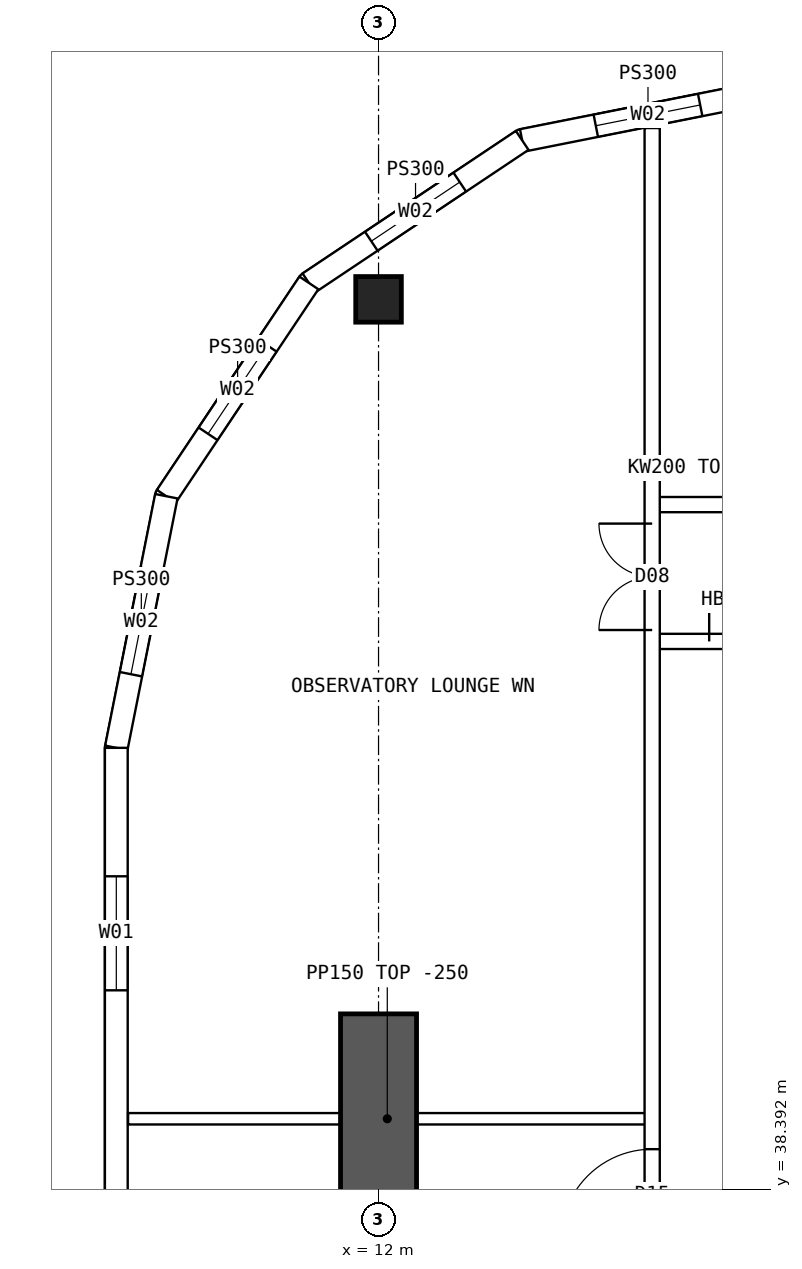
"""IFC4 building model, lengths in metres.
Left out: names, types, materials, properties, quantities, classifications, styles, units other than length and angle.
Written with IfcOpenShell. Run it as: python <this file> out.ifc"""

import sys

from ifc_helpers import new_model, si_unit, direction, frame, frame_2d, origin, origin_2d, place, context, subcontext, project, spatial, polyline, rectangle, hollow_rectangle, outline, extrude, element, fill, save


model = new_model("IFC4")
c1 = context("Model", 3, precision=1e-05, world=origin(), true_north=direction((0.0, 1.0)))
c2 = subcontext(c1, "Body", "Model", "MODEL_VIEW")
j1 = project(units=[si_unit("LENGTHUNIT", "METRE"), si_unit("PLANEANGLEUNIT", "RADIAN")], contexts=[c1])
p1 = place(None, origin())
s1 = spatial("IfcSite", under=j1, at=p1, CompositionType="ELEMENT")
p2 = place(p1, origin())
s2 = spatial("IfcBuilding", under=s1, at=p2, CompositionType="ELEMENT")
p3 = place(p2, frame((0.0, 0.0, 224.05)))
s3 = spatial("IfcBuildingStorey", under=s2, at=p3, CompositionType="ELEMENT", Elevation=224.05)
p4 = place(p3, frame((12.0, 50.1, 0.0), z_axis=(0.0, 0.0, 1.0), x_axis=(1.0, 0.0, 0.0)))
e1 = element("IfcColumn", 1, at=p4, inside=s3, PredefinedType="COLUMN", context=c2, shape_type="SweptSolid", body=[
    extrude(hollow_rectangle(XDim=0.6, YDim=0.6, WallThickness=0.06, at=origin_2d()), origin(), (0.0, 0.0, 1.0), 3.75),
])
p5 = place(p3, frame((12.0, 35.7, 0.0), z_axis=(0.0, 0.0, 1.0), x_axis=(0.0, 1.0, 0.0)))
e2 = element("IfcWall", 2, at=p5, inside=s3, PredefinedType="SHEAR", context=c2, shape_type="SweptSolid", body=[
    extrude(rectangle(XDim=5.0, YDim=1.0, at=frame_2d((2.5, 0.0))), origin(), (0.0, 0.0, 1.0), 3.75),
])
p6 = place(p3, frame((8.55, 44.2, 0.0), z_axis=(0.0, 0.0, 1.0), x_axis=(0.0, -1.0, 0.0)))
e3 = element("IfcWall", 3, at=p6, inside=s3, PredefinedType="SOLIDWALL", context=c2, shape_type="SweptSolid", body=[
    extrude(outline(polyline([(-0.015, -0.15), (24.415, -0.15), (24.385, 0.15), (0.015, 0.15), (-0.015, -0.15)])), origin(), (0.0, 0.0, 1.0), 3.5),
])
p7 = place(p6, frame((1.69, 0.0, 0.9)))
e4 = element("IfcOpeningElement", 4, at=p7, cuts=e3, PredefinedType="OPENING", context=c2, shape_type="SweptSolid", body=[
    extrude(rectangle(XDim=1.5, YDim=2.0, at=frame_2d((0.75, 1.0))), frame((0.0, 0.16, 0.0), z_axis=(0.0, -1.0, 0.0), x_axis=(1.0, 0.0, 0.0)), (0.0, 0.0, 1.0), 0.32),
])
p8 = place(p6, frame((6.57, 0.0, 0.9)))
e5 = element("IfcOpeningElement", 5, at=p8, cuts=e3, PredefinedType="OPENING", context=c2, shape_type="SweptSolid", body=[
    extrude(rectangle(XDim=1.5, YDim=2.0, at=frame_2d((0.75, 1.0))), frame((0.0, 0.16, 0.0), z_axis=(0.0, -1.0, 0.0), x_axis=(1.0, 0.0, 0.0)), (0.0, 0.0, 1.0), 0.32),
])
p9 = place(p6, frame((11.45, 0.0, 0.9)))
e6 = element("IfcOpeningElement", 6, at=p9, cuts=e3, PredefinedType="OPENING", context=c2, shape_type="SweptSolid", body=[
    extrude(rectangle(XDim=1.5, YDim=2.0, at=frame_2d((0.75, 1.0))), frame((0.0, 0.16, 0.0), z_axis=(0.0, -1.0, 0.0), x_axis=(1.0, 0.0, 0.0)), (0.0, 0.0, 1.0), 0.32),
])
p10 = place(p6, frame((16.33, 0.0, 0.9)))
e7 = element("IfcOpeningElement", 7, at=p10, cuts=e3, PredefinedType="OPENING", context=c2, shape_type="SweptSolid", body=[
    extrude(rectangle(XDim=1.5, YDim=2.0, at=frame_2d((0.75, 1.0))), frame((0.0, 0.16, 0.0), z_axis=(0.0, -1.0, 0.0), x_axis=(1.0, 0.0, 0.0)), (0.0, 0.0, 1.0), 0.32),
])
p11 = place(p6, frame((21.21, 0.0, 0.9)))
e8 = element("IfcOpeningElement", 8, at=p11, cuts=e3, PredefinedType="OPENING", context=c2, shape_type="SweptSolid", body=[
    extrude(rectangle(XDim=1.5, YDim=2.0, at=frame_2d((0.75, 1.0))), frame((0.0, 0.16, 0.0), z_axis=(0.0, -1.0, 0.0), x_axis=(1.0, 0.0, 0.0)), (0.0, 0.0, 1.0), 0.32),
])
p12 = place(p3, frame((17.2, 52.85, 0.0), z_axis=(0.0, 0.0, 1.0), x_axis=(-0.98078325777, -0.195100490205, 0.0)))
e9 = element("IfcWall", 9, at=p12, inside=s3, PredefinedType="SOLIDWALL", context=c2, shape_type="SweptSolid", body=[
    extrude(outline(polyline([(-0.03, -0.15), (3.405, -0.15), (3.345, 0.15), (0.03, 0.15), (-0.03, -0.15)])), origin(), (0.0, 0.0, 1.0), 3.5),
])
p13 = place(p12, frame((0.988, 0.0, 0.9)))
e10 = element("IfcOpeningElement", 10, at=p13, cuts=e9, PredefinedType="OPENING", context=c2, shape_type="SweptSolid", body=[
    extrude(rectangle(XDim=1.4, YDim=1.8, at=frame_2d((0.7, 0.9))), frame((0.0, 0.16, 0.0), z_axis=(0.0, -1.0, 0.0), x_axis=(1.0, 0.0, 0.0)), (0.0, 0.0, 1.0), 0.32),
])
p14 = place(p3, frame((13.89, 52.192, 0.0), z_axis=(0.0, 0.0, 1.0), x_axis=(-0.831460037396, -0.555584562613, 0.0)))
e11 = element("IfcWall", 11, at=p14, inside=s3, PredefinedType="SOLIDWALL", context=c2, shape_type="SweptSolid", body=[
    extrude(outline(polyline([(-0.03, -0.15), (3.405, -0.15), (3.345, 0.15), (0.03, 0.15), (-0.03, -0.15)])), origin(), (0.0, 0.0, 1.0), 3.5),
])
p15 = place(p14, frame((0.988, 0.0, 0.9)))
e12 = element("IfcOpeningElement", 12, at=p15, cuts=e11, PredefinedType="OPENING", context=c2, shape_type="SweptSolid", body=[
    extrude(rectangle(XDim=1.4, YDim=1.8, at=frame_2d((0.7, 0.9))), frame((0.0, 0.16, 0.0), z_axis=(0.0, -1.0, 0.0), x_axis=(1.0, 0.0, 0.0)), (0.0, 0.0, 1.0), 0.32),
])
p16 = place(p3, frame((11.083, 50.316, 0.0), z_axis=(0.0, 0.0, 1.0), x_axis=(-0.555567969291, -0.831471124873, 0.0)))
e13 = element("IfcWall", 13, at=p16, inside=s3, PredefinedType="SOLIDWALL", context=c2, shape_type="SweptSolid", body=[
    extrude(outline(polyline([(-0.03, -0.15), (3.405, -0.15), (3.345, 0.15), (0.03, 0.15), (-0.03, -0.15)])), origin(), (0.0, 0.0, 1.0), 3.5),
])
p17 = place(p16, frame((0.988, 0.0, 0.9)))
e14 = element("IfcOpeningElement", 14, at=p17, cuts=e13, PredefinedType="OPENING", context=c2, shape_type="SweptSolid", body=[
    extrude(rectangle(XDim=1.4, YDim=1.8, at=frame_2d((0.7, 0.9))), frame((0.0, 0.16, 0.0), z_axis=(0.0, -1.0, 0.0), x_axis=(1.0, 0.0, 0.0)), (0.0, 0.0, 1.0), 0.32),
])
p18 = place(p3, frame((9.208, 47.51, 0.0), z_axis=(0.0, 0.0, 1.0), x_axis=(-0.19508664885, -0.980786011034, 0.0)))
e15 = element("IfcWall", 15, at=p18, inside=s3, PredefinedType="SOLIDWALL", context=c2, shape_type="SweptSolid", body=[
    extrude(outline(polyline([(-0.03, -0.15), (3.39, -0.15), (3.36, 0.15), (0.03, 0.15), (-0.03, -0.15)])), origin(), (0.0, 0.0, 1.0), 3.5),
])
p19 = place(p18, frame((0.988, 0.0, 0.9)))
e16 = element("IfcOpeningElement", 16, at=p19, cuts=e15, PredefinedType="OPENING", context=c2, shape_type="SweptSolid", body=[
    extrude(rectangle(XDim=1.4, YDim=1.8, at=frame_2d((0.7, 0.9))), frame((0.0, 0.16, 0.0), z_axis=(0.0, -1.0, 0.0), x_axis=(1.0, 0.0, 0.0)), (0.0, 0.0, 1.0), 0.32),
])
p20 = place(p3, frame((15.6, 47.4, 0.0), z_axis=(0.0, 0.0, 1.0), x_axis=(1.0, 0.0, 0.0)))
e17 = element("IfcWall", 17, at=p20, inside=s3, PredefinedType="SOLIDWALL", context=c2, shape_type="SweptSolid", body=[
    extrude(rectangle(XDim=2.05, YDim=0.2, at=frame_2d((1.025, 0.0))), origin(), (0.0, 0.0, 1.0), 3.5),
])
p21 = place(p20, frame((0.95, 0.0, 0.0)))
e18 = element("IfcOpeningElement", 18, at=p21, cuts=e17, PredefinedType="OPENING", context=c2, shape_type="SweptSolid", body=[
    extrude(rectangle(XDim=0.9, YDim=2.1, at=frame_2d((0.45, 1.05))), frame((0.0, 0.11, 0.0), z_axis=(0.0, -1.0, 0.0), x_axis=(1.0, 0.0, 0.0)), (0.0, 0.0, 1.0), 0.22),
])
p22 = place(p3, frame((15.6, 45.6, 0.0), z_axis=(0.0, 0.0, 1.0), x_axis=(1.0, 0.0, 0.0)))
e19 = element("IfcWall", 19, at=p22, inside=s3, PredefinedType="SOLIDWALL", context=c2, shape_type="SweptSolid", body=[
    extrude(rectangle(XDim=2.05, YDim=0.2, at=frame_2d((1.025, 0.0))), origin(), (0.0, 0.0, 1.0), 3.5),
])
p23 = place(p22, frame((0.75, 0.0, 0.0)))
e20 = element("IfcOpeningElement", 20, at=p23, cuts=e19, PredefinedType="OPENING", context=c2, shape_type="SweptSolid", body=[
    extrude(rectangle(XDim=1.2, YDim=2.1, at=frame_2d((0.6, 1.05))), frame((0.0, 0.11, 0.0), z_axis=(0.0, -1.0, 0.0), x_axis=(1.0, 0.0, 0.0)), (0.0, 0.0, 1.0), 0.22),
])
p24 = place(p3, frame((15.6, 11.646, 0.0), z_axis=(0.0, 0.0, 1.0), x_axis=(0.0, 1.0, 0.0)))
e21 = element("IfcWall", 21, at=p24, inside=s3, PredefinedType="SOLIDWALL", context=c2, shape_type="SweptSolid", body=[
    extrude(rectangle(XDim=40.708, YDim=0.2, at=frame_2d((20.354, 0.0))), origin(), (0.0, 0.0, 1.0), 3.5),
])
p25 = place(p24, frame((13.434, 0.0, 0.0)))
e22 = element("IfcOpeningElement", 22, at=p25, cuts=e21, PredefinedType="OPENING", context=c2, shape_type="SweptSolid", body=[
    extrude(rectangle(XDim=1.2, YDim=2.1, at=frame_2d((0.6, 1.05))), frame((0.0, 0.11, 0.0), z_axis=(0.0, -1.0, 0.0), x_axis=(1.0, 0.0, 0.0)), (0.0, 0.0, 1.0), 0.22),
])
p26 = place(p24, frame((26.074, 0.0, 0.0)))
e23 = element("IfcOpeningElement", 23, at=p26, cuts=e21, PredefinedType="OPENING", context=c2, shape_type="SweptSolid", body=[
    extrude(rectangle(XDim=1.2, YDim=2.1, at=frame_2d((0.6, 1.05))), frame((0.0, 0.11, 0.0), z_axis=(0.0, -1.0, 0.0), x_axis=(1.0, 0.0, 0.0)), (0.0, 0.0, 1.0), 0.22),
])
p27 = place(p24, frame((5.104, 0.0, 0.0)))
e24 = element("IfcOpeningElement", 24, at=p27, cuts=e21, PredefinedType="OPENING", context=c2, shape_type="SweptSolid", body=[
    extrude(rectangle(XDim=1.4, YDim=2.1, at=frame_2d((0.7, 1.05))), frame((0.0, 0.11, 0.0), z_axis=(0.0, -1.0, 0.0), x_axis=(1.0, 0.0, 0.0)), (0.0, 0.0, 1.0), 0.22),
])
p28 = place(p24, frame((34.104, 0.0, 0.0)))
e25 = element("IfcOpeningElement", 25, at=p28, cuts=e21, PredefinedType="OPENING", context=c2, shape_type="SweptSolid", body=[
    extrude(rectangle(XDim=1.4, YDim=2.1, at=frame_2d((0.7, 1.05))), frame((0.0, 0.11, 0.0), z_axis=(0.0, -1.0, 0.0), x_axis=(1.0, 0.0, 0.0)), (0.0, 0.0, 1.0), 0.22),
])
p29 = place(p3, frame((8.705, 39.32, 0.0), z_axis=(0.0, 0.0, 1.0), x_axis=(1.0, 0.0, 0.0)))
e26 = element("IfcWall", 26, at=p29, inside=s3, PredefinedType="PARTITIONING", context=c2, shape_type="SweptSolid", body=[
    extrude(rectangle(XDim=6.82, YDim=0.15, at=frame_2d((3.41, 0.0))), origin(), (0.0, 0.0, 1.0), 3.5),
])
p30 = place(p7, origin())
e27 = element("IfcWindow", 27, at=p30, inside=s3, PartitioningType="SINGLE_PANEL", PredefinedType="WINDOW", context=c2, shape_type="SweptSolid", body=[
    extrude(rectangle(XDim=1.5, YDim=2.0, at=frame_2d((0.75, 1.0))), frame((0.0, 0.03, 0.0), z_axis=(0.0, -1.0, 0.0), x_axis=(1.0, 0.0, 0.0)), (0.0, 0.0, 1.0), 0.06),
])
fill(e4, e27)
p31 = place(p13, origin())
e28 = element("IfcWindow", 28, at=p31, inside=s3, PartitioningType="SINGLE_PANEL", PredefinedType="WINDOW", context=c2, shape_type="SweptSolid", body=[
    extrude(rectangle(XDim=1.4, YDim=1.8, at=frame_2d((0.7, 0.9))), frame((0.0, 0.03, 0.0), z_axis=(0.0, -1.0, 0.0), x_axis=(1.0, 0.0, 0.0)), (0.0, 0.0, 1.0), 0.06),
])
fill(e10, e28)
p32 = place(p15, origin())
e29 = element("IfcWindow", 29, at=p32, inside=s3, PartitioningType="SINGLE_PANEL", PredefinedType="WINDOW", context=c2, shape_type="SweptSolid", body=[
    extrude(rectangle(XDim=1.4, YDim=1.8, at=frame_2d((0.7, 0.9))), frame((0.0, 0.03, 0.0), z_axis=(0.0, -1.0, 0.0), x_axis=(1.0, 0.0, 0.0)), (0.0, 0.0, 1.0), 0.06),
])
fill(e12, e29)
p33 = place(p17, origin())
e30 = element("IfcWindow", 30, at=p33, inside=s3, PartitioningType="SINGLE_PANEL", PredefinedType="WINDOW", context=c2, shape_type="SweptSolid", body=[
    extrude(rectangle(XDim=1.4, YDim=1.8, at=frame_2d((0.7, 0.9))), frame((0.0, 0.03, 0.0), z_axis=(0.0, -1.0, 0.0), x_axis=(1.0, 0.0, 0.0)), (0.0, 0.0, 1.0), 0.06),
])
fill(e14, e30)
p34 = place(p19, origin())
e31 = element("IfcWindow", 31, at=p34, inside=s3, PartitioningType="SINGLE_PANEL", PredefinedType="WINDOW", context=c2, shape_type="SweptSolid", body=[
    extrude(rectangle(XDim=1.4, YDim=1.8, at=frame_2d((0.7, 0.9))), frame((0.0, 0.03, 0.0), z_axis=(0.0, -1.0, 0.0), x_axis=(1.0, 0.0, 0.0)), (0.0, 0.0, 1.0), 0.06),
])
fill(e16, e31)
p35 = place(p23, origin())
e32 = element("IfcDoor", 32, at=p35, inside=s3, OperationType="DOUBLE_DOOR_SINGLE_SWING", PredefinedType="DOOR", context=c2, shape_type="SweptSolid", body=[
    extrude(rectangle(XDim=1.2, YDim=2.1, at=frame_2d((0.6, 1.05))), frame((0.0, 0.025, 0.0), z_axis=(0.0, -1.0, 0.0), x_axis=(1.0, 0.0, 0.0)), (0.0, 0.0, 1.0), 0.05),
])
fill(e20, e32)
p36 = place(p26, origin())
e33 = element("IfcDoor", 33, at=p36, inside=s3, OperationType="SINGLE_SWING_LEFT", PredefinedType="DOOR", context=c2, shape_type="SweptSolid", body=[
    extrude(rectangle(XDim=1.2, YDim=2.1, at=frame_2d((0.6, 1.05))), frame((0.0, 0.025, 0.0), z_axis=(0.0, -1.0, 0.0), x_axis=(1.0, 0.0, 0.0)), (0.0, 0.0, 1.0), 0.05),
])
fill(e23, e33)
p37 = place(p28, origin())
e34 = element("IfcDoor", 34, at=p37, inside=s3, OperationType="DOUBLE_DOOR_SINGLE_SWING", PredefinedType="DOOR", context=c2, shape_type="SweptSolid", body=[
    extrude(rectangle(XDim=1.4, YDim=2.1, at=frame_2d((0.7, 1.05))), frame((0.0, 0.025, 0.0), z_axis=(0.0, -1.0, 0.0), x_axis=(1.0, 0.0, 0.0)), (0.0, 0.0, 1.0), 0.05),
])
fill(e25, e34)
save(model, sys.argv[1])
